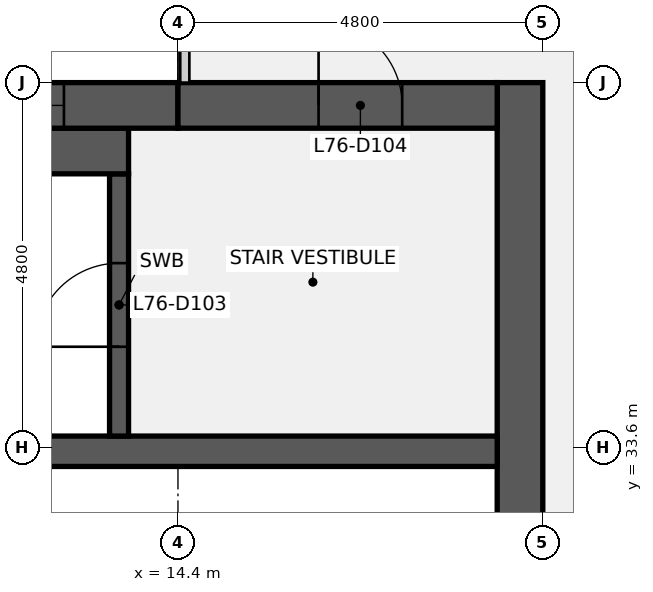
"""IFC4 building model, lengths in metres.
Left out: names, types, materials, properties, quantities, classifications, styles, units other than length and angle.
Written with IfcOpenShell. Run it as: python <this file> out.ifc"""

import sys

from ifc_helpers import new_model, si_unit, direction, frame, frame_2d, origin, place, context, subcontext, project, spatial, rectangle, extrude, element, fill, save


model = new_model("IFC4")
c1 = context("Model", 3, precision=1e-05, world=origin(), true_north=direction((0.0, 1.0)))
c2 = subcontext(c1, "Body", "Model", "MODEL_VIEW")
j1 = project(units=[si_unit("LENGTHUNIT", "METRE"), si_unit("PLANEANGLEUNIT", "RADIAN")], contexts=[c1])
p1 = place(None, origin())
s1 = spatial("IfcSite", under=j1, at=p1, CompositionType="ELEMENT")
p2 = place(p1, origin())
s2 = spatial("IfcBuilding", under=s1, at=p2, CompositionType="ELEMENT")
p3 = place(p2, frame((0.0, 0.0, 342.3)))
s3 = spatial("IfcBuildingStorey", under=s2, at=p3, CompositionType="ELEMENT", Elevation=342.3)
p4 = place(p3, frame((18.9, 38.4, 0.0), z_axis=(0.0, 0.0, 1.0), x_axis=(0.0, -1.0, 0.0)))
e1 = element("IfcWall", 1, at=p4, inside=s3, PredefinedType="SHEAR", context=c2, shape_type="SweptSolid", body=[
    extrude(rectangle(XDim=28.8, YDim=0.6, at=frame_2d((14.4, 0.0))), origin(), (0.0, 0.0, 1.0), 3.84),
])
p5 = place(p4, frame((18.3, 0.0, 0.0)))
e2 = element("IfcOpeningElement", 2, at=p5, cuts=e1, PredefinedType="OPENING", context=c2, shape_type="SweptSolid", body=[
    extrude(rectangle(XDim=1.8, YDim=2.1, at=frame_2d((0.9, 1.05))), frame((0.0, 0.31, 0.0), z_axis=(0.0, -1.0, 0.0), x_axis=(1.0, 0.0, 0.0)), (0.0, 0.0, 1.0), 0.62),
])
p6 = place(p4, frame((8.7, 0.0, 0.0)))
e3 = element("IfcOpeningElement", 3, at=p6, cuts=e1, PredefinedType="OPENING", context=c2, shape_type="SweptSolid", body=[
    extrude(rectangle(XDim=1.8, YDim=2.1, at=frame_2d((0.9, 1.05))), frame((0.0, 0.31, 0.0), z_axis=(0.0, -1.0, 0.0), x_axis=(1.0, 0.0, 0.0)), (0.0, 0.0, 1.0), 0.62),
])
p7 = place(p3, frame((0.6, 33.55, 0.0), z_axis=(0.0, 0.0, 1.0), x_axis=(1.0, 0.0, 0.0)))
e4 = element("IfcWall", 4, at=p7, inside=s3, PredefinedType="SHEAR", context=c2, shape_type="SweptSolid", body=[
    extrude(rectangle(XDim=18.0, YDim=0.4, at=frame_2d((9.0, 0.0))), origin(), (0.0, 0.0, 1.0), 3.84),
])
p8 = place(p3, frame((13.625, 33.75, 0.0), z_axis=(0.0, 0.0, 1.0), x_axis=(0.0, 1.0, 0.0)))
e5 = element("IfcWall", 5, at=p8, inside=s3, PredefinedType="SHEAR", context=c2, shape_type="SweptSolid", body=[
    extrude(rectangle(XDim=3.45, YDim=0.25, at=frame_2d((1.725, 0.0))), origin(), (0.0, 0.0, 1.0), 3.84),
])
p9 = place(p8, frame((1.175, 0.0, 0.0)))
e6 = element("IfcOpeningElement", 6, at=p9, cuts=e5, PredefinedType="OPENING", context=c2, shape_type="SweptSolid", body=[
    extrude(rectangle(XDim=1.1, YDim=2.1, at=frame_2d((0.55, 1.05))), frame((0.0, 0.135, 0.0), z_axis=(0.0, -1.0, 0.0), x_axis=(1.0, 0.0, 0.0)), (0.0, 0.0, 1.0), 0.27),
])
p10 = place(p3, frame((6.25, 37.5, 0.0), z_axis=(0.0, 0.0, 1.0), x_axis=(1.0, 0.0, 0.0)))
e7 = element("IfcWall", 7, at=p10, inside=s3, PredefinedType="SHEAR", context=c2, shape_type="SweptSolid", body=[
    extrude(rectangle(XDim=7.5, YDim=0.6, at=frame_2d((3.75, 0.0))), origin(), (0.0, 0.0, 1.0), 3.84),
])
p11 = place(p3, frame((0.6, 38.1, 0.0), z_axis=(0.0, 0.0, 1.0), x_axis=(1.0, 0.0, 0.0)))
e8 = element("IfcWall", 8, at=p11, inside=s3, PredefinedType="SHEAR", context=c2, shape_type="SweptSolid", body=[
    extrude(rectangle(XDim=13.8, YDim=0.6, at=frame_2d((6.9, 0.0))), origin(), (0.0, 0.0, 1.0), 3.84),
])
p12 = place(p11, frame((5.7, 0.0, 0.9)))
e9 = element("IfcOpeningElement", 9, at=p12, cuts=e8, PredefinedType="OPENING", context=c2, shape_type="SweptSolid", body=[
    extrude(rectangle(XDim=1.8, YDim=1.5, at=frame_2d((0.9, 0.75))), frame((0.0, 0.31, 0.0), z_axis=(0.0, -1.0, 0.0), x_axis=(1.0, 0.0, 0.0)), (0.0, 0.0, 1.0), 0.62),
])
p13 = place(p11, frame((10.5, 0.0, 0.9)))
e10 = element("IfcOpeningElement", 10, at=p13, cuts=e8, PredefinedType="OPENING", context=c2, shape_type="SweptSolid", body=[
    extrude(rectangle(XDim=1.8, YDim=1.5, at=frame_2d((0.9, 0.75))), frame((0.0, 0.31, 0.0), z_axis=(0.0, -1.0, 0.0), x_axis=(1.0, 0.0, 0.0)), (0.0, 0.0, 1.0), 0.62),
])
p14 = place(p3, frame((14.4, 38.1, 0.0), z_axis=(0.0, 0.0, 1.0), x_axis=(1.0, 0.0, 0.0)))
e11 = element("IfcWall", 11, at=p14, inside=s3, PredefinedType="SHEAR", context=c2, shape_type="SweptSolid", body=[
    extrude(rectangle(XDim=4.2, YDim=0.6, at=frame_2d((2.1, 0.0))), origin(), (0.0, 0.0, 1.0), 3.84),
])
p15 = place(p14, frame((1.85, 0.0, 0.0)))
e12 = element("IfcOpeningElement", 12, at=p15, cuts=e11, PredefinedType="OPENING", context=c2, shape_type="SweptSolid", body=[
    extrude(rectangle(XDim=1.1, YDim=2.1, at=frame_2d((0.55, 1.05))), frame((0.0, 0.31, 0.0), z_axis=(0.0, -1.0, 0.0), x_axis=(1.0, 0.0, 0.0)), (0.0, 0.0, 1.0), 0.62),
])
p16 = place(p9, origin())
e13 = element("IfcDoor", 13, at=p16, inside=s3, OperationType="SINGLE_SWING_LEFT", PredefinedType="DOOR", context=c2, shape_type="SweptSolid", body=[
    extrude(rectangle(XDim=1.1, YDim=2.1, at=frame_2d((0.55, 1.05))), frame((0.0, 0.025, 0.0), z_axis=(0.0, -1.0, 0.0), x_axis=(1.0, 0.0, 0.0)), (0.0, 0.0, 1.0), 0.05),
])
fill(e6, e13)
p17 = place(p15, origin())
e14 = element("IfcDoor", 14, at=p17, inside=s3, OperationType="SINGLE_SWING_LEFT", PredefinedType="DOOR", context=c2, shape_type="SweptSolid", body=[
    extrude(rectangle(XDim=1.1, YDim=2.1, at=frame_2d((0.55, 1.05))), frame((0.0, 0.025, 0.0), z_axis=(0.0, -1.0, 0.0), x_axis=(1.0, 0.0, 0.0)), (0.0, 0.0, 1.0), 0.05),
])
fill(e12, e14)
p18 = place(p13, origin())
e15 = element("IfcWindow", 15, at=p18, inside=s3, PartitioningType="SINGLE_PANEL", PredefinedType="WINDOW", context=c2, shape_type="SweptSolid", body=[
    extrude(rectangle(XDim=1.8, YDim=1.5, at=frame_2d((0.9, 0.75))), frame((0.0, 0.03, 0.0), z_axis=(0.0, -1.0, 0.0), x_axis=(1.0, 0.0, 0.0)), (0.0, 0.0, 1.0), 0.06),
])
fill(e10, e15)
save(model, sys.argv[1])
